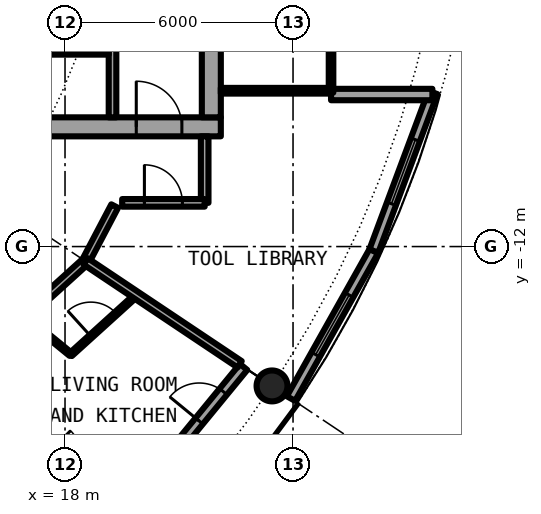
"""IFC4 building model, lengths in metres.
Left out: names, types, materials, properties, quantities, classifications, styles, units other than length and angle.
Written with IfcOpenShell. Run it as: python <this file> out.ifc"""

import sys

from ifc_helpers import new_model, si_unit, direction, frame, frame_2d, origin, origin_2d, place, context, subcontext, project, spatial, rectangle, hollow_circle, extrude, element, fill, save


model = new_model("IFC4")
c1 = context("Model", 3, precision=1e-05, world=origin(), true_north=direction((0.0, 1.0)))
c2 = subcontext(c1, "Body", "Model", "MODEL_VIEW")
j1 = project(units=[si_unit("LENGTHUNIT", "METRE"), si_unit("PLANEANGLEUNIT", "RADIAN")], contexts=[c1])
p1 = place(None, origin())
s1 = spatial("IfcSite", under=j1, at=p1, CompositionType="ELEMENT")
p2 = place(p1, origin())
s2 = spatial("IfcBuilding", under=s1, at=p2, CompositionType="ELEMENT")
p3 = place(p2, frame((0.0, 0.0, 161.6)))
s3 = spatial("IfcBuildingStorey", under=s2, at=p3, CompositionType="ELEMENT", Elevation=161.6)
p4 = place(p3, frame((23.448, -15.667, 0.0), z_axis=(0.0, 0.0, 1.0), x_axis=(1.0, 0.0, 0.0)))
e1 = element("IfcColumn", 1, at=p4, inside=s3, PredefinedType="COLUMN", context=c2, shape_type="SweptSolid", body=[
    extrude(hollow_circle(Radius=0.406, WallThickness=0.04, at=origin_2d()), origin(), (0.0, 0.0, 1.0), 3.05),
])
p5 = place(p3, frame((19.304, -19.304, 0.0), z_axis=(0.0, 0.0, 1.0), x_axis=(0.634382322723, 0.773019449054, 0.0)))
e2 = element("IfcWall", 2, at=p5, inside=s3, PredefinedType="SOLIDWALL", context=c2, shape_type="SweptSolid", body=[
    extrude(rectangle(XDim=5.352, YDim=0.25, at=frame_2d((2.676, 0.0))), origin(), (0.0, 0.0, 1.0), 2.7),
])
p6 = place(p5, frame((0.441, 0.0, 0.3)))
e3 = element("IfcOpeningElement", 3, at=p6, cuts=e2, PredefinedType="OPENING", context=c2, shape_type="SweptSolid", body=[
    extrude(rectangle(XDim=1.8, YDim=2.1, at=frame_2d((0.9, 1.05))), frame((0.0, 0.135, 0.0), z_axis=(0.0, -1.0, 0.0), x_axis=(1.0, 0.0, 0.0)), (0.0, 0.0, 1.0), 0.27),
])
p7 = place(p5, frame((3.51, 0.0, 0.0)))
e4 = element("IfcOpeningElement", 4, at=p7, cuts=e2, PredefinedType="OPENING", context=c2, shape_type="SweptSolid", body=[
    extrude(rectangle(XDim=1.0, YDim=2.2, at=frame_2d((0.5, 1.1))), frame((0.0, 0.135, 0.0), z_axis=(0.0, -1.0, 0.0), x_axis=(1.0, 0.0, 0.0)), (0.0, 0.0, 1.0), 0.27),
])
p8 = place(p3, frame((23.946, -16.0, 0.0), z_axis=(0.0, 0.0, 1.0), x_axis=(0.489696356642, 0.871893042919, 0.0)))
e5 = element("IfcWall", 5, at=p8, inside=s3, PredefinedType="SOLIDWALL", context=c2, shape_type="SweptSolid", body=[
    extrude(rectangle(XDim=4.454, YDim=0.25, at=frame_2d((2.227, 0.0))), origin(), (0.0, 0.0, 1.0), 2.7),
])
p9 = place(p8, frame((1.327, 0.0, 0.3)))
e6 = element("IfcOpeningElement", 6, at=p9, cuts=e5, PredefinedType="OPENING", context=c2, shape_type="SweptSolid", body=[
    extrude(rectangle(XDim=1.8, YDim=2.1, at=frame_2d((0.9, 1.05))), frame((0.0, 0.135, 0.0), z_axis=(0.0, -1.0, 0.0), x_axis=(1.0, 0.0, 0.0)), (0.0, 0.0, 1.0), 0.27),
])
p10 = place(p3, frame((26.127, -12.117, 0.0), z_axis=(0.0, 0.0, 1.0), x_axis=(0.349247811493, 0.937030397675, 0.0)))
e7 = element("IfcWall", 7, at=p10, inside=s3, PredefinedType="SOLIDWALL", context=c2, shape_type="SweptSolid", body=[
    extrude(rectangle(XDim=4.452, YDim=0.25, at=frame_2d((2.226, 0.0))), origin(), (0.0, 0.0, 1.0), 2.7),
])
p11 = place(p10, frame((1.327, 0.0, 0.3)))
e8 = element("IfcOpeningElement", 8, at=p11, cuts=e7, PredefinedType="OPENING", context=c2, shape_type="SweptSolid", body=[
    extrude(rectangle(XDim=1.8, YDim=2.1, at=frame_2d((0.9, 1.05))), frame((0.0, 0.135, 0.0), z_axis=(0.0, -1.0, 0.0), x_axis=(1.0, 0.0, 0.0)), (0.0, 0.0, 1.0), 0.27),
])
p12 = place(p3, frame((25.0, -8.0, 0.0), z_axis=(0.0, 0.0, 1.0), x_axis=(1.0, 0.0, 0.0)))
e9 = element("IfcWall", 9, at=p12, inside=s3, PredefinedType="SOLIDWALL", context=c2, shape_type="SweptSolid", body=[
    extrude(rectangle(XDim=2.667, YDim=0.3, at=frame_2d((1.333, 0.0))), origin(), (0.0, 0.0, 1.0), 2.7),
])
p13 = place(p3, frame((8.5, -8.85, 0.0), z_axis=(0.0, 0.0, 1.0), x_axis=(1.0, 0.0, 0.0)))
e10 = element("IfcWall", 10, at=p13, inside=s3, PredefinedType="SHEAR", context=c2, shape_type="SweptSolid", body=[
    extrude(rectangle(XDim=13.6, YDim=0.5, at=frame_2d((6.8, 0.0))), origin(), (0.0, 0.0, 1.0), 3.05),
])
p14 = place(p13, frame((11.375, 0.0, 0.0)))
e11 = element("IfcOpeningElement", 11, at=p14, cuts=e10, PredefinedType="OPENING", context=c2, shape_type="SweptSolid", body=[
    extrude(rectangle(XDim=1.2, YDim=2.3, at=frame_2d((0.6, 1.15))), frame((0.0, 0.26, 0.0), z_axis=(0.0, -1.0, 0.0), x_axis=(1.0, 0.0, 0.0)), (0.0, 0.0, 1.0), 0.52),
])
p15 = place(p3, frame((21.85, 8.6, 0.0), z_axis=(0.0, 0.0, 1.0), x_axis=(0.0, -1.0, 0.0)))
e12 = element("IfcWall", 12, at=p15, inside=s3, PredefinedType="SHEAR", context=c2, shape_type="SweptSolid", body=[
    extrude(rectangle(XDim=17.2, YDim=0.5, at=frame_2d((8.6, 0.0))), origin(), (0.0, 0.0, 1.0), 3.05),
])
p16 = place(p15, frame((7.7, 0.0, 0.0)))
e13 = element("IfcOpeningElement", 13, at=p16, cuts=e12, PredefinedType="OPENING", context=c2, shape_type="SweptSolid", body=[
    extrude(rectangle(XDim=1.8, YDim=2.3, at=frame_2d((0.9, 1.15))), frame((0.0, 0.26, 0.0), z_axis=(0.0, -1.0, 0.0), x_axis=(1.0, 0.0, 0.0)), (0.0, 0.0, 1.0), 0.52),
])
p17 = place(p3, frame((19.25, -8.6, 0.0), z_axis=(0.0, 0.0, 1.0), x_axis=(0.0, 1.0, 0.0)))
e14 = element("IfcWall", 14, at=p17, inside=s3, PredefinedType="SOLIDWALL", context=c2, shape_type="SweptSolid", body=[
    extrude(rectangle(XDim=7.025, YDim=0.2, at=frame_2d((3.513, 0.0))), origin(), (0.0, 0.0, 1.0), 2.7),
])
p18 = place(p17, frame((2.35, 0.0, 0.0)))
e15 = element("IfcOpeningElement", 15, at=p18, cuts=e14, PredefinedType="OPENING", context=c2, shape_type="SweptSolid", body=[
    extrude(rectangle(XDim=1.1, YDim=2.3, at=frame_2d((0.55, 1.15))), frame((0.0, 0.11, 0.0), z_axis=(0.0, -1.0, 0.0), x_axis=(1.0, 0.0, 0.0)), (0.0, 0.0, 1.0), 0.22),
])
p19 = place(p3, frame((15.45, -6.875, 0.0), z_axis=(0.0, 0.0, 1.0), x_axis=(1.0, 0.0, 0.0)))
e16 = element("IfcWall", 16, at=p19, inside=s3, PredefinedType="PARTITIONING", context=c2, shape_type="SweptSolid", body=[
    extrude(rectangle(XDim=3.7, YDim=0.15, at=frame_2d((1.85, 0.0))), origin(), (0.0, 0.0, 1.0), 2.7),
])
p20 = place(p19, frame((1.4, 0.0, 0.0)))
e17 = element("IfcOpeningElement", 17, at=p20, cuts=e16, PredefinedType="OPENING", context=c2, shape_type="SweptSolid", body=[
    extrude(rectangle(XDim=0.9, YDim=2.3, at=frame_2d((0.45, 1.15))), frame((0.0, 0.085, 0.0), z_axis=(0.0, -1.0, 0.0), x_axis=(1.0, 0.0, 0.0)), (0.0, 0.0, 1.0), 0.17),
])
p21 = place(p3, frame((22.1, -7.9, 0.0), z_axis=(0.0, 0.0, 1.0), x_axis=(1.0, 0.0, 0.0)))
e18 = element("IfcWall", 18, at=p21, inside=s3, PredefinedType="PARTITIONING", context=c2, shape_type="SweptSolid", body=[
    extrude(rectangle(XDim=2.84, YDim=0.15, at=frame_2d((1.42, 0.0))), origin(), (0.0, 0.0, 1.0), 2.7),
])
p22 = place(p3, frame((25.0, -7.95, 0.0), z_axis=(0.0, 0.0, 1.0), x_axis=(0.0, 1.0, 0.0)))
e19 = element("IfcWall", 19, at=p22, inside=s3, PredefinedType="PARTITIONING", context=c2, shape_type="SweptSolid", body=[
    extrude(rectangle(XDim=15.9, YDim=0.12, at=frame_2d((7.95, 0.0))), origin(), (0.0, 0.0, 1.0), 2.7),
])
p23 = place(p22, frame((0.95, 0.0, 0.1)))
e20 = element("IfcOpeningElement", 20, at=p23, cuts=e19, PredefinedType="OPENING", context=c2, shape_type="SweptSolid", body=[
    extrude(rectangle(XDim=14.0, YDim=2.35, at=frame_2d((7.0, 1.175))), frame((0.0, 0.07, 0.0), z_axis=(0.0, -1.0, 0.0), x_axis=(1.0, 0.0, 0.0)), (0.0, 0.0, 1.0), 0.14),
])
p24 = place(p3, frame((18.147, -14.844, 0.0), z_axis=(0.0, 0.0, 1.0), x_axis=(0.741080073381, 0.671416655169, 0.0)))
e21 = element("IfcWall", 21, at=p24, inside=s3, PredefinedType="PARTITIONING", context=c2, shape_type="SweptSolid", body=[
    extrude(rectangle(XDim=2.323, YDim=0.1, at=frame_2d((1.162, 0.0))), origin(), (0.0, 0.0, 1.0), 2.7),
])
p25 = place(p24, frame((0.718, 0.0, 0.0)))
e22 = element("IfcOpeningElement", 22, at=p25, cuts=e21, PredefinedType="OPENING", context=c2, shape_type="SweptSolid", body=[
    extrude(rectangle(XDim=0.9, YDim=2.3, at=frame_2d((0.45, 1.15))), frame((0.0, 0.06, 0.0), z_axis=(0.0, -1.0, 0.0), x_axis=(1.0, 0.0, 0.0)), (0.0, 0.0, 1.0), 0.12),
])
p26 = place(p3, frame((18.542, -12.389, 0.0), z_axis=(0.0, 0.0, 1.0), x_axis=(0.465605550524, 0.884992356646, 0.0)))
e23 = element("IfcWall", 23, at=p26, inside=s3, PredefinedType="PARTITIONING", context=c2, shape_type="SweptSolid", body=[
    extrude(rectangle(XDim=1.643, YDim=0.2, at=frame_2d((0.821, 0.0))), origin(), (0.0, 0.0, 1.0), 2.7),
])
p27 = place(p3, frame((21.675, -10.85, 0.0), z_axis=(0.0, 0.0, 1.0), x_axis=(0.0, 1.0, 0.0)))
e24 = element("IfcWall", 24, at=p27, inside=s3, PredefinedType="PARTITIONING", context=c2, shape_type="SweptSolid", body=[
    extrude(rectangle(XDim=1.75, YDim=0.2, at=frame_2d((0.875, 0.0))), origin(), (0.0, 0.0, 1.0), 2.7),
])
p28 = place(p3, frame((10.512, -19.667, 0.0), z_axis=(0.0, 0.0, 1.0), x_axis=(0.740947367223, 0.671563101283, 0.0)))
e25 = element("IfcWall", 25, at=p28, inside=s3, PredefinedType="PARTITIONING", context=c2, shape_type="SweptSolid", body=[
    extrude(rectangle(XDim=10.837, YDim=0.2, at=frame_2d((5.419, 0.0))), origin(), (0.0, 0.0, 1.0), 2.7),
])
p29 = place(p28, frame((3.835, 0.0, 0.0)))
e26 = element("IfcOpeningElement", 26, at=p29, cuts=e25, PredefinedType="OPENING", context=c2, shape_type="SweptSolid", body=[
    extrude(rectangle(XDim=1.0, YDim=2.3, at=frame_2d((0.5, 1.15))), frame((0.0, 0.11, 0.0), z_axis=(0.0, -1.0, 0.0), x_axis=(1.0, 0.0, 0.0)), (0.0, 0.0, 1.0), 0.22),
])
p30 = place(p3, frame((19.504, -10.85, 0.0), z_axis=(0.0, 0.0, 1.0), x_axis=(1.0, 0.0, 0.0)))
e27 = element("IfcWall", 27, at=p30, inside=s3, PredefinedType="PARTITIONING", context=c2, shape_type="SweptSolid", body=[
    extrude(rectangle(XDim=2.171, YDim=0.2, at=frame_2d((1.085, 0.0))), origin(), (0.0, 0.0, 1.0), 2.7),
])
p31 = place(p30, frame((0.585, 0.0, 0.0)))
e28 = element("IfcOpeningElement", 28, at=p31, cuts=e27, PredefinedType="OPENING", context=c2, shape_type="SweptSolid", body=[
    extrude(rectangle(XDim=1.0, YDim=2.3, at=frame_2d((0.5, 1.15))), frame((0.0, 0.11, 0.0), z_axis=(0.0, -1.0, 0.0), x_axis=(1.0, 0.0, 0.0)), (0.0, 0.0, 1.0), 0.22),
])
p32 = place(p3, frame((16.427, -16.401, 0.0), z_axis=(0.0, 0.0, 1.0), x_axis=(0.707722727509, -0.706490297858, 0.0)))
e29 = element("IfcWall", 29, at=p32, inside=s3, PredefinedType="PARTITIONING", context=c2, shape_type="SweptSolid", body=[
    extrude(rectangle(XDim=3.962, YDim=0.1, at=frame_2d((1.981, 0.0))), origin(), (0.0, 0.0, 1.0), 2.7),
])
p33 = place(p32, frame((1.531, 0.0, 0.0)))
e30 = element("IfcOpeningElement", 30, at=p33, cuts=e29, PredefinedType="OPENING", context=c2, shape_type="SweptSolid", body=[
    extrude(rectangle(XDim=0.9, YDim=2.3, at=frame_2d((0.45, 1.15))), frame((0.0, 0.06, 0.0), z_axis=(0.0, -1.0, 0.0), x_axis=(1.0, 0.0, 0.0)), (0.0, 0.0, 1.0), 0.12),
])
p34 = place(p3, frame((16.936, -13.845, 0.0), z_axis=(0.0, 0.0, 1.0), x_axis=(0.774283039722, -0.632839453889, 0.0)))
e31 = element("IfcWall", 31, at=p34, inside=s3, PredefinedType="PARTITIONING", context=c2, shape_type="SweptSolid", body=[
    extrude(rectangle(XDim=1.569, YDim=0.1, at=frame_2d((0.785, 0.0))), origin(), (0.0, 0.0, 1.0), 2.7),
])
p35 = place(p3, frame((18.542, -12.389, 0.0), z_axis=(0.0, 0.0, 1.0), x_axis=(0.831387096605, -0.55569370664, 0.0)))
e32 = element("IfcWall", 32, at=p35, inside=s3, PredefinedType="PARTITIONING", context=c2, shape_type="SweptSolid", body=[
    extrude(rectangle(XDim=4.875, YDim=0.2, at=frame_2d((2.438, 0.0))), origin(), (0.0, 0.0, 1.0), 2.7),
])
p36 = place(p7, origin())
e33 = element("IfcDoor", 33, at=p36, inside=s3, OperationType="SINGLE_SWING_LEFT", PredefinedType="DOOR", context=c2, shape_type="SweptSolid", body=[
    extrude(rectangle(XDim=1.0, YDim=2.2, at=frame_2d((0.5, 1.1))), frame((0.0, 0.025, 0.0), z_axis=(0.0, -1.0, 0.0), x_axis=(1.0, 0.0, 0.0)), (0.0, 0.0, 1.0), 0.05),
])
fill(e4, e33)
p37 = place(p9, origin())
e34 = element("IfcWindow", 34, at=p37, inside=s3, PartitioningType="SINGLE_PANEL", PredefinedType="WINDOW", context=c2, shape_type="SweptSolid", body=[
    extrude(rectangle(XDim=1.8, YDim=2.1, at=frame_2d((0.9, 1.05))), frame((0.0, 0.03, 0.0), z_axis=(0.0, -1.0, 0.0), x_axis=(1.0, 0.0, 0.0)), (0.0, 0.0, 1.0), 0.06),
])
fill(e6, e34)
p38 = place(p11, origin())
e35 = element("IfcWindow", 35, at=p38, inside=s3, PartitioningType="SINGLE_PANEL", PredefinedType="WINDOW", context=c2, shape_type="SweptSolid", body=[
    extrude(rectangle(XDim=1.8, YDim=2.1, at=frame_2d((0.9, 1.05))), frame((0.0, 0.03, 0.0), z_axis=(0.0, -1.0, 0.0), x_axis=(1.0, 0.0, 0.0)), (0.0, 0.0, 1.0), 0.06),
])
fill(e8, e35)
p39 = place(p20, origin())
e36 = element("IfcDoor", 36, at=p39, inside=s3, OperationType="SINGLE_SWING_LEFT", PredefinedType="DOOR", context=c2, shape_type="SweptSolid", body=[
    extrude(rectangle(XDim=0.9, YDim=2.3, at=frame_2d((0.45, 1.15))), frame((0.0, 0.025, 0.0), z_axis=(0.0, -1.0, 0.0), x_axis=(1.0, 0.0, 0.0)), (0.0, 0.0, 1.0), 0.05),
])
fill(e17, e36)
p40 = place(p14, origin())
e37 = element("IfcDoor", 37, at=p40, inside=s3, OperationType="SINGLE_SWING_LEFT", PredefinedType="DOOR", context=c2, shape_type="SweptSolid", body=[
    extrude(rectangle(XDim=1.2, YDim=2.3, at=frame_2d((0.6, 1.15))), frame((0.0, 0.025, 0.0), z_axis=(0.0, -1.0, 0.0), x_axis=(1.0, 0.0, 0.0)), (0.0, 0.0, 1.0), 0.05),
])
fill(e11, e37)
p41 = place(p23, origin())
e38 = element("IfcWindow", 38, at=p41, inside=s3, PartitioningType="SINGLE_PANEL", PredefinedType="WINDOW", context=c2, shape_type="SweptSolid", body=[
    extrude(rectangle(XDim=14.0, YDim=2.35, at=frame_2d((7.0, 1.175))), frame((0.0, 0.03, 0.0), z_axis=(0.0, -1.0, 0.0), x_axis=(1.0, 0.0, 0.0)), (0.0, 0.0, 1.0), 0.06),
])
fill(e20, e38)
p42 = place(p25, origin())
e39 = element("IfcDoor", 39, at=p42, inside=s3, OperationType="SINGLE_SWING_RIGHT", PredefinedType="DOOR", context=c2, shape_type="SweptSolid", body=[
    extrude(rectangle(XDim=0.9, YDim=2.3, at=frame_2d((0.45, 1.15))), frame((0.0, 0.025, 0.0), z_axis=(0.0, -1.0, 0.0), x_axis=(1.0, 0.0, 0.0)), (0.0, 0.0, 1.0), 0.05),
])
fill(e22, e39)
p43 = place(p31, origin())
e40 = element("IfcDoor", 40, at=p43, inside=s3, OperationType="SINGLE_SWING_LEFT", PredefinedType="DOOR", context=c2, shape_type="SweptSolid", body=[
    extrude(rectangle(XDim=1.0, YDim=2.3, at=frame_2d((0.5, 1.15))), frame((0.0, 0.025, 0.0), z_axis=(0.0, -1.0, 0.0), x_axis=(1.0, 0.0, 0.0)), (0.0, 0.0, 1.0), 0.05),
])
fill(e28, e40)
save(model, sys.argv[1])
